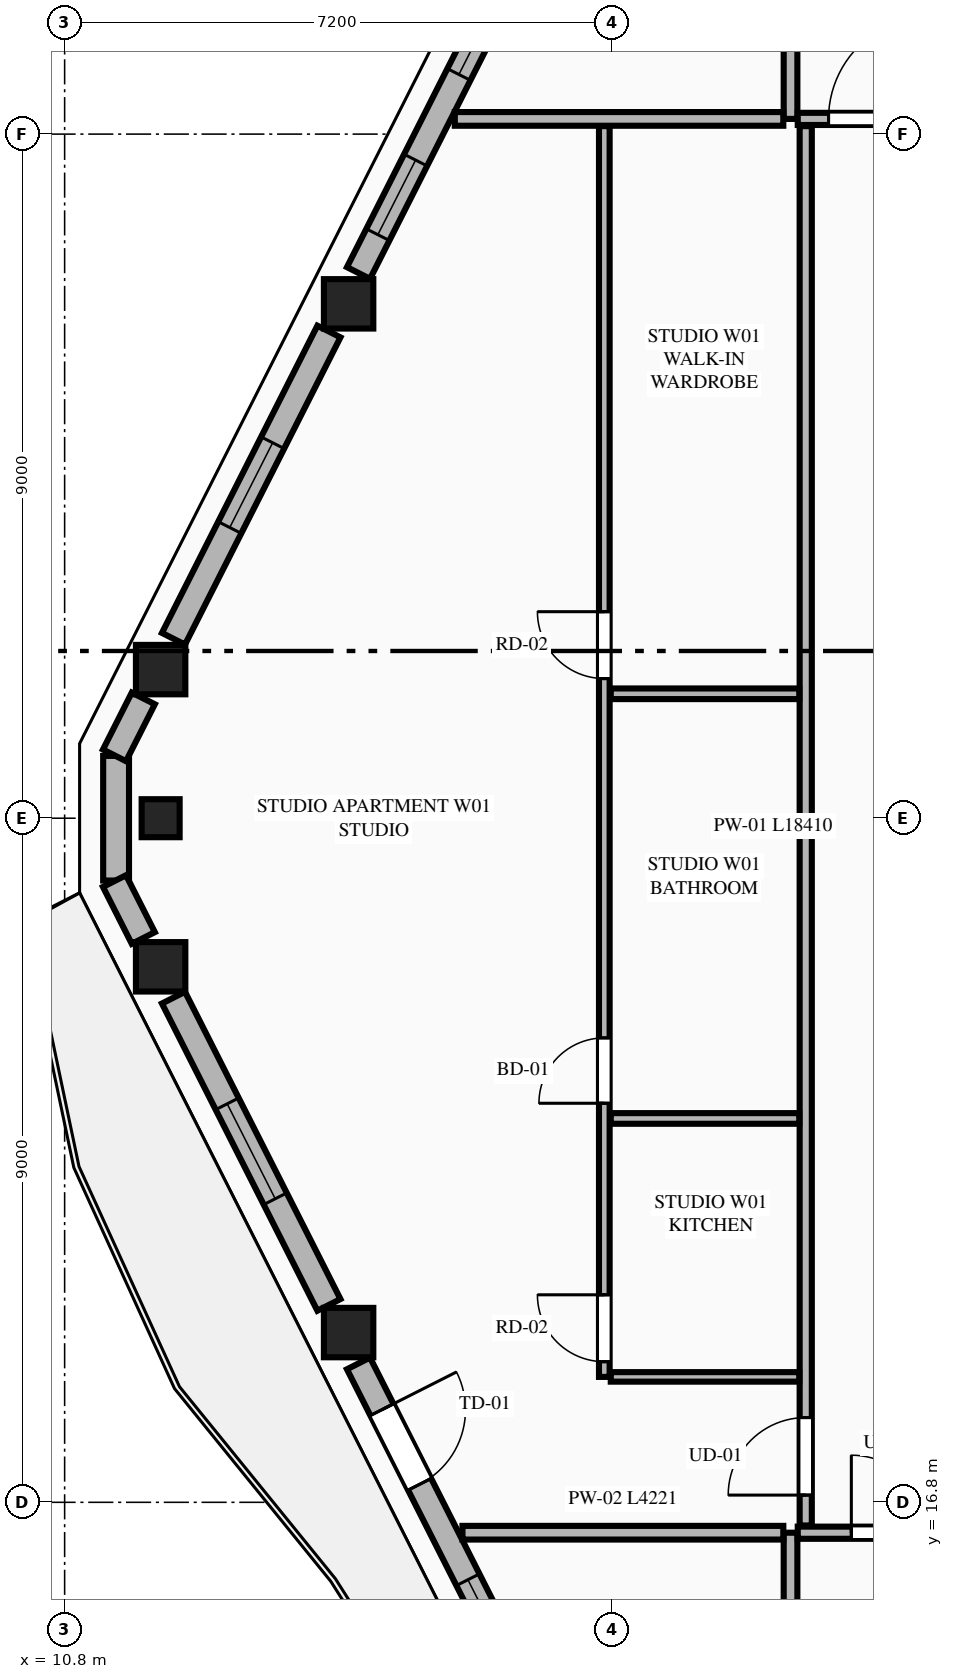
"""IFC4 building model, lengths in metres.
Left out: names, types, materials, properties, quantities, classifications, styles, units other than length and angle.
Written with IfcOpenShell. Run it as: python <this file> out.ifc"""

import sys

from ifc_helpers import new_model, si_unit, direction, frame, frame_2d, origin, origin_2d, place, context, subcontext, project, spatial, rectangle, extrude, element, fill, save


model = new_model("IFC4")
c1 = context("Model", 3, precision=1e-05, world=origin(), true_north=direction((0.0, 1.0)))
c2 = subcontext(c1, "Body", "Model", "MODEL_VIEW")
j1 = project(units=[si_unit("LENGTHUNIT", "METRE"), si_unit("PLANEANGLEUNIT", "RADIAN")], contexts=[c1])
p1 = place(None, origin())
s1 = spatial("IfcSite", under=j1, at=p1, CompositionType="ELEMENT")
p2 = place(p1, origin())
s2 = spatial("IfcBuilding", under=s1, at=p2, CompositionType="ELEMENT")
p3 = place(p2, frame((0.0, 0.0, 263.5)))
s3 = spatial("IfcBuildingStorey", under=s2, at=p3, CompositionType="ELEMENT", Elevation=263.5)
for number, where, z_axis, x_axis in (
    (1, (14.536, 32.567, 0.0), (0.0, 0.0, 1.0), (1.0, 0.0, 0.0)),
    (2, (12.063, 27.755, 0.0), (0.0, 0.0, 1.0), (1.0, 0.0, 0.0)),
    (3, (12.063, 23.845, 0.0), (0.0, 0.0, 1.0), (1.0, 0.0, 0.0)),
    (4, (14.536, 19.033, 0.0), (0.0, 0.0, 1.0), (1.0, 0.0, 0.0)),
):
    element("IfcColumn", number, at=place(p3, frame(where, z_axis=z_axis, x_axis=x_axis)), inside=s3, PredefinedType="COLUMN", context=c2, shape_type="SweptSolid", body=[
        extrude(rectangle(XDim=0.65, YDim=0.65, at=origin_2d()), origin(), (0.0, 0.0, 1.0), 3.65),
    ])
p4 = place(p3, frame((12.063, 25.8, 0.0), z_axis=(0.0, 0.0, 1.0), x_axis=(0.0, -1.0, 0.0)))
e5 = element("IfcColumn", 5, at=p4, inside=s3, PredefinedType="PILASTER", context=c2, shape_type="SweptSolid", body=[
    extrude(rectangle(XDim=0.5, YDim=0.35, at=origin_2d()), origin(), (0.0, 0.0, 1.0), 3.65),
])
p5 = place(p3, frame((11.477, 26.62, 0.0), z_axis=(0.0, 0.0, 1.0), x_axis=(0.0, -1.0, 0.0)))
e6 = element("IfcWall", 6, at=p5, inside=s3, PredefinedType="STANDARD", context=c2, shape_type="SweptSolid", body=[
    extrude(rectangle(XDim=1.64, YDim=0.34, at=frame_2d((0.82, 0.0))), origin(), (0.0, 0.0, 1.0), 3.45),
])
p6 = place(p3, frame((16.798, 37.187, 0.0), z_axis=(0.0, 0.0, 1.0), x_axis=(-0.451447516904, -0.892297674255, 0.0)))
e7 = element("IfcWall", 7, at=p6, inside=s3, PredefinedType="STANDARD", context=c2, shape_type="SweptSolid", body=[
    extrude(rectangle(XDim=4.723, YDim=0.34, at=frame_2d((2.361, 0.0))), origin(), (0.0, 0.0, 1.0), 2.983),
])
p7 = place(p6, frame((0.396, 0.0, 0.75)))
e8 = element("IfcOpeningElement", 8, at=p7, cuts=e7, PredefinedType="OPENING", context=c2, shape_type="SweptSolid", body=[
    extrude(rectangle(XDim=1.4, YDim=2.05, at=frame_2d((0.7, 1.025))), frame((0.0, 0.18, 0.0), z_axis=(0.0, -1.0, 0.0), x_axis=(1.0, 0.0, 0.0)), (0.0, 0.0, 1.0), 0.36),
])
p8 = place(p6, frame((3.058, 0.0, 0.75)))
e9 = element("IfcOpeningElement", 9, at=p8, cuts=e7, PredefinedType="OPENING", context=c2, shape_type="SweptSolid", body=[
    extrude(rectangle(XDim=1.1, YDim=2.0, at=frame_2d((0.55, 1.0))), frame((0.0, 0.18, 0.0), z_axis=(0.0, -1.0, 0.0), x_axis=(1.0, 0.0, 0.0)), (0.0, 0.0, 1.0), 0.36),
])
p9 = place(p3, frame((14.277, 32.203, 0.0), z_axis=(0.0, 0.0, 1.0), x_axis=(-0.45147697324, -0.892282770558, 0.0)))
e10 = element("IfcWall", 10, at=p9, inside=s3, PredefinedType="STANDARD", context=c2, shape_type="SweptSolid", body=[
    extrude(rectangle(XDim=4.53, YDim=0.34, at=frame_2d((2.265, 0.0))), origin(), (0.0, 0.0, 1.0), 2.983),
])
p10 = place(p9, frame((1.64, 0.0, 0.75)))
e11 = element("IfcOpeningElement", 11, at=p10, cuts=e10, PredefinedType="OPENING", context=c2, shape_type="SweptSolid", body=[
    extrude(rectangle(XDim=1.25, YDim=1.95, at=frame_2d((0.625, 0.975))), frame((0.0, 0.18, 0.0), z_axis=(0.0, -1.0, 0.0), x_axis=(1.0, 0.0, 0.0)), (0.0, 0.0, 1.0), 0.36),
])
p11 = place(p3, frame((11.835, 27.376, 0.0), z_axis=(0.0, 0.0, 1.0), x_axis=(-0.45139691133, -0.892323275748, 0.0)))
e12 = element("IfcWall", 12, at=p11, inside=s3, PredefinedType="STANDARD", context=c2, shape_type="SweptSolid", body=[
    extrude(rectangle(XDim=0.839, YDim=0.34, at=frame_2d((0.42, 0.0))), origin(), (0.0, 0.0, 1.0), 3.45),
])
p12 = place(p3, frame((11.456, 24.973, 0.0), z_axis=(0.0, 0.0, 1.0), x_axis=(0.4515140893, -0.892263989615, 0.0)))
e13 = element("IfcWall", 13, at=p12, inside=s3, PredefinedType="STANDARD", context=c2, shape_type="SweptSolid", body=[
    extrude(rectangle(XDim=0.839, YDim=0.34, at=frame_2d((0.419, 0.0))), origin(), (0.0, 0.0, 1.0), 3.45),
])
p13 = place(p3, frame((12.232, 23.439, 0.0), z_axis=(0.0, 0.0, 1.0), x_axis=(0.45147697324, -0.892282770558, 0.0)))
e14 = element("IfcWall", 14, at=p13, inside=s3, PredefinedType="STANDARD", context=c2, shape_type="SweptSolid", body=[
    extrude(rectangle(XDim=4.53, YDim=0.34, at=frame_2d((2.265, 0.0))), origin(), (0.0, 0.0, 1.0), 2.983),
])
p14 = place(p13, frame((1.565, 0.0, 0.75)))
e15 = element("IfcOpeningElement", 15, at=p14, cuts=e14, PredefinedType="OPENING", context=c2, shape_type="SweptSolid", body=[
    extrude(rectangle(XDim=1.4, YDim=2.05, at=frame_2d((0.7, 1.025))), frame((0.0, 0.18, 0.0), z_axis=(0.0, -1.0, 0.0), x_axis=(1.0, 0.0, 0.0)), (0.0, 0.0, 1.0), 0.36),
])
p15 = place(p3, frame((14.666, 18.627, 0.0), z_axis=(0.0, 0.0, 1.0), x_axis=(0.451468341582, -0.892287137949, 0.0)))
e16 = element("IfcWall", 16, at=p15, inside=s3, PredefinedType="STANDARD", context=c2, shape_type="SweptSolid", body=[
    extrude(rectangle(XDim=4.723, YDim=0.34, at=frame_2d((2.361, 0.0))), origin(), (0.0, 0.0, 1.0), 2.983),
])
p16 = place(p15, frame((0.682, 0.0, 0.0)))
e17 = element("IfcOpeningElement", 17, at=p16, cuts=e16, PredefinedType="OPENING", context=c2, shape_type="SweptSolid", body=[
    extrude(rectangle(XDim=1.1, YDim=2.25, at=frame_2d((0.55, 1.125))), frame((0.0, 0.18, 0.0), z_axis=(0.0, -1.0, 0.0), x_axis=(1.0, 0.0, 0.0)), (0.0, 0.0, 1.0), 0.36),
])
p17 = place(p15, frame((3.189, 0.0, 0.75)))
e18 = element("IfcOpeningElement", 18, at=p17, cuts=e16, PredefinedType="OPENING", context=c2, shape_type="SweptSolid", body=[
    extrude(rectangle(XDim=1.1, YDim=2.0, at=frame_2d((0.55, 1.0))), frame((0.0, 0.18, 0.0), z_axis=(0.0, -1.0, 0.0), x_axis=(1.0, 0.0, 0.0)), (0.0, 0.0, 1.0), 0.36),
])
p18 = place(p3, frame((20.35, 8.119, 0.0), z_axis=(0.0, 0.0, 1.0), x_axis=(0.0, 1.0, 0.0)))
e19 = element("IfcWall", 19, at=p18, inside=s3, PredefinedType="PARTITIONING", context=c2, shape_type="SweptSolid", body=[
    extrude(rectangle(XDim=8.281, YDim=0.18, at=frame_2d((4.141, 0.0))), origin(), (0.0, 0.0, 1.0), 3.45),
])
p19 = place(p3, frame((20.445, 16.4, 0.0), z_axis=(0.0, 0.0, 1.0), x_axis=(1.0, 0.0, 0.0)))
e20 = element("IfcWall", 20, at=p19, inside=s3, PredefinedType="PARTITIONING", context=c2, shape_type="SweptSolid", body=[
    extrude(rectangle(XDim=23.91, YDim=0.16, at=frame_2d((11.955, 0.0))), origin(), (0.0, 0.0, 1.0), 3.45),
])
p20 = place(p19, frame((0.705, 0.0, 0.0)))
e21 = element("IfcOpeningElement", 21, at=p20, cuts=e20, PredefinedType="OPENING", context=c2, shape_type="SweptSolid", body=[
    extrude(rectangle(XDim=1.02, YDim=2.25, at=frame_2d((0.51, 1.125))), frame((0.0, 0.09, 0.0), z_axis=(0.0, -1.0, 0.0), x_axis=(1.0, 0.0, 0.0)), (0.0, 0.0, 1.0), 0.18),
])
p21 = place(p3, frame((20.35, 35.0, 0.0), z_axis=(0.0, 0.0, 1.0), x_axis=(0.0, 1.0, 0.0)))
e22 = element("IfcWall", 22, at=p21, inside=s3, PredefinedType="PARTITIONING", context=c2, shape_type="SweptSolid", body=[
    extrude(rectangle(XDim=8.481, YDim=0.18, at=frame_2d((4.24, 0.0))), origin(), (0.0, 0.0, 1.0), 3.45),
])
p22 = place(p3, frame((20.445, 35.0, 0.0), z_axis=(0.0, 0.0, 1.0), x_axis=(1.0, 0.0, 0.0)))
e23 = element("IfcWall", 23, at=p22, inside=s3, PredefinedType="PARTITIONING", context=c2, shape_type="SweptSolid", body=[
    extrude(rectangle(XDim=23.91, YDim=0.16, at=frame_2d((11.955, 0.0))), origin(), (0.0, 0.0, 1.0), 3.45),
])
p23 = place(p22, frame((0.405, 0.0, 0.0)))
e24 = element("IfcOpeningElement", 24, at=p23, cuts=e23, PredefinedType="OPENING", context=c2, shape_type="SweptSolid", body=[
    extrude(rectangle(XDim=1.35, YDim=2.35, at=frame_2d((0.675, 1.175))), frame((0.0, 0.09, 0.0), z_axis=(0.0, -1.0, 0.0), x_axis=(1.0, 0.0, 0.0)), (0.0, 0.0, 1.0), 0.18),
])
p24 = place(p3, frame((16.034, 16.4, 0.0), z_axis=(0.0, 0.0, 1.0), x_axis=(1.0, 0.0, 0.0)))
e25 = element("IfcWall", 25, at=p24, inside=s3, PredefinedType="PARTITIONING", context=c2, shape_type="SweptSolid", body=[
    extrude(rectangle(XDim=4.221, YDim=0.18, at=frame_2d((2.11, 0.0))), origin(), (0.0, 0.0, 1.0), 3.45),
])
p25 = place(p3, frame((15.933, 35.0, 0.0), z_axis=(0.0, 0.0, 1.0), x_axis=(1.0, 0.0, 0.0)))
e26 = element("IfcWall", 26, at=p25, inside=s3, PredefinedType="PARTITIONING", context=c2, shape_type="SweptSolid", body=[
    extrude(rectangle(XDim=4.322, YDim=0.18, at=frame_2d((2.161, 0.0))), origin(), (0.0, 0.0, 1.0), 3.45),
])
p26 = place(p3, frame((20.55, 16.495, 0.0), z_axis=(0.0, 0.0, 1.0), x_axis=(0.0, 1.0, 0.0)))
e27 = element("IfcWall", 27, at=p26, inside=s3, PredefinedType="PARTITIONING", context=c2, shape_type="SweptSolid", body=[
    extrude(rectangle(XDim=18.41, YDim=0.16, at=frame_2d((9.205, 0.0))), origin(), (0.0, 0.0, 1.0), 3.137),
])
p27 = place(p26, frame((0.4, 0.0, 0.0)))
e28 = element("IfcOpeningElement", 28, at=p27, cuts=e27, PredefinedType="OPENING", context=c2, shape_type="SweptSolid", body=[
    extrude(rectangle(XDim=1.02, YDim=2.25, at=frame_2d((0.51, 1.125))), frame((0.0, 0.09, 0.0), z_axis=(0.0, -1.0, 0.0), x_axis=(1.0, 0.0, 0.0)), (0.0, 0.0, 1.0), 0.18),
])
p28 = place(p3, frame((17.985, 18.45, 0.0), z_axis=(0.0, 0.0, 1.0), x_axis=(1.0, 0.0, 0.0)))
e29 = element("IfcWall", 29, at=p28, inside=s3, PredefinedType="PARTITIONING", context=c2, shape_type="SweptSolid", body=[
    extrude(rectangle(XDim=2.48, YDim=0.125, at=frame_2d((1.24, 0.0))), origin(), (0.0, 0.0, 1.0), 3.45),
])
p29 = place(p3, frame((17.9, 18.45, 0.0), z_axis=(0.0, 0.0, 1.0), x_axis=(0.0, 1.0, 0.0)))
e30 = element("IfcWall", 30, at=p29, inside=s3, PredefinedType="PLUMBINGWALL", context=c2, shape_type="SweptSolid", body=[
    extrude(rectangle(XDim=16.455, YDim=0.14, at=frame_2d((8.228, 0.0))), origin(), (0.0, 0.0, 1.0), 3.45),
])
p30 = place(p29, frame((3.6, 0.0, 0.0)))
e31 = element("IfcOpeningElement", 31, at=p30, cuts=e30, PredefinedType="OPENING", context=c2, shape_type="SweptSolid", body=[
    extrude(rectangle(XDim=0.86, YDim=2.1, at=frame_2d((0.43, 1.05))), frame((0.0, 0.08, 0.0), z_axis=(0.0, -1.0, 0.0), x_axis=(1.0, 0.0, 0.0)), (0.0, 0.0, 1.0), 0.16),
])
p31 = place(p29, frame((9.187, 0.0, 0.0)))
e32 = element("IfcOpeningElement", 32, at=p31, cuts=e30, PredefinedType="OPENING", context=c2, shape_type="SweptSolid", body=[
    extrude(rectangle(XDim=0.88, YDim=2.15, at=frame_2d((0.44, 1.075))), frame((0.0, 0.08, 0.0), z_axis=(0.0, -1.0, 0.0), x_axis=(1.0, 0.0, 0.0)), (0.0, 0.0, 1.0), 0.16),
])
p32 = place(p29, frame((0.2, 0.0, 0.0)))
e33 = element("IfcOpeningElement", 33, at=p32, cuts=e30, PredefinedType="OPENING", context=c2, shape_type="SweptSolid", body=[
    extrude(rectangle(XDim=0.88, YDim=2.15, at=frame_2d((0.44, 1.075))), frame((0.0, 0.08, 0.0), z_axis=(0.0, -1.0, 0.0), x_axis=(1.0, 0.0, 0.0)), (0.0, 0.0, 1.0), 0.16),
])
for number, where, z_axis, x_axis in (
    (34, (17.985, 21.85, 0.0), (0.0, 0.0, 1.0), (1.0, 0.0, 0.0)),
    (35, (17.985, 27.437, 0.0), (0.0, 0.0, 1.0), (1.0, 0.0, 0.0)),
):
    element("IfcWall", number, at=place(p3, frame(where, z_axis=z_axis, x_axis=x_axis)), inside=s3, PredefinedType="PLUMBINGWALL", context=c2, shape_type="SweptSolid", body=[
        extrude(rectangle(XDim=2.48, YDim=0.14, at=frame_2d((1.24, 0.0))), origin(), (0.0, 0.0, 1.0), 3.45),
    ])
p33 = place(p7, origin())
e36 = element("IfcWindow", 36, at=p33, inside=s3, PartitioningType="SINGLE_PANEL", PredefinedType="WINDOW", context=c2, shape_type="SweptSolid", body=[
    extrude(rectangle(XDim=1.4, YDim=2.05, at=frame_2d((0.7, 1.025))), frame((0.0, 0.03, 0.0), z_axis=(0.0, -1.0, 0.0), x_axis=(1.0, 0.0, 0.0)), (0.0, 0.0, 1.0), 0.06),
])
fill(e8, e36)
p34 = place(p10, origin())
e37 = element("IfcWindow", 37, at=p34, inside=s3, PartitioningType="SINGLE_PANEL", PredefinedType="WINDOW", context=c2, shape_type="SweptSolid", body=[
    extrude(rectangle(XDim=1.25, YDim=1.95, at=frame_2d((0.625, 0.975))), frame((0.0, 0.03, 0.0), z_axis=(0.0, -1.0, 0.0), x_axis=(1.0, 0.0, 0.0)), (0.0, 0.0, 1.0), 0.06),
])
fill(e11, e37)
p35 = place(p14, origin())
e38 = element("IfcWindow", 38, at=p35, inside=s3, PartitioningType="SINGLE_PANEL", PredefinedType="WINDOW", context=c2, shape_type="SweptSolid", body=[
    extrude(rectangle(XDim=1.4, YDim=2.05, at=frame_2d((0.7, 1.025))), frame((0.0, 0.03, 0.0), z_axis=(0.0, -1.0, 0.0), x_axis=(1.0, 0.0, 0.0)), (0.0, 0.0, 1.0), 0.06),
])
fill(e15, e38)
p36 = place(p16, origin())
e39 = element("IfcDoor", 39, at=p36, inside=s3, OperationType="SINGLE_SWING_LEFT", PredefinedType="DOOR", context=c2, shape_type="SweptSolid", body=[
    extrude(rectangle(XDim=1.1, YDim=2.25, at=frame_2d((0.55, 1.125))), frame((0.0, 0.025, 0.0), z_axis=(0.0, -1.0, 0.0), x_axis=(1.0, 0.0, 0.0)), (0.0, 0.0, 1.0), 0.05),
])
fill(e17, e39)
p37 = place(p20, origin())
e40 = element("IfcDoor", 40, at=p37, inside=s3, OperationType="SINGLE_SWING_LEFT", PredefinedType="DOOR", context=c2, shape_type="SweptSolid", body=[
    extrude(rectangle(XDim=1.02, YDim=2.25, at=frame_2d((0.51, 1.125))), frame((0.0, 0.025, 0.0), z_axis=(0.0, -1.0, 0.0), x_axis=(1.0, 0.0, 0.0)), (0.0, 0.0, 1.0), 0.05),
])
fill(e21, e40)
p38 = place(p23, origin())
e41 = element("IfcDoor", 41, at=p38, inside=s3, OperationType="SINGLE_SWING_RIGHT", PredefinedType="DOOR", context=c2, shape_type="SweptSolid", body=[
    extrude(rectangle(XDim=1.35, YDim=2.35, at=frame_2d((0.675, 1.175))), frame((0.0, 0.025, 0.0), z_axis=(0.0, -1.0, 0.0), x_axis=(1.0, 0.0, 0.0)), (0.0, 0.0, 1.0), 0.05),
])
fill(e24, e41)
p39 = place(p30, origin())
e42 = element("IfcDoor", 42, at=p39, inside=s3, OperationType="SINGLE_SWING_LEFT", PredefinedType="DOOR", context=c2, shape_type="SweptSolid", body=[
    extrude(rectangle(XDim=0.86, YDim=2.1, at=frame_2d((0.43, 1.05))), frame((0.0, 0.025, 0.0), z_axis=(0.0, -1.0, 0.0), x_axis=(1.0, 0.0, 0.0)), (0.0, 0.0, 1.0), 0.05),
])
fill(e31, e42)
p40 = place(p31, origin())
e43 = element("IfcDoor", 43, at=p40, inside=s3, OperationType="SINGLE_SWING_RIGHT", PredefinedType="DOOR", context=c2, shape_type="SweptSolid", body=[
    extrude(rectangle(XDim=0.88, YDim=2.15, at=frame_2d((0.44, 1.075))), frame((0.0, 0.025, 0.0), z_axis=(0.0, -1.0, 0.0), x_axis=(1.0, 0.0, 0.0)), (0.0, 0.0, 1.0), 0.05),
])
fill(e32, e43)
p41 = place(p27, origin())
e44 = element("IfcDoor", 44, at=p41, inside=s3, OperationType="SINGLE_SWING_LEFT", PredefinedType="DOOR", context=c2, shape_type="SweptSolid", body=[
    extrude(rectangle(XDim=1.02, YDim=2.25, at=frame_2d((0.51, 1.125))), frame((0.0, 0.025, 0.0), z_axis=(0.0, -1.0, 0.0), x_axis=(1.0, 0.0, 0.0)), (0.0, 0.0, 1.0), 0.05),
])
fill(e28, e44)
p42 = place(p32, origin())
e45 = element("IfcDoor", 45, at=p42, inside=s3, OperationType="SINGLE_SWING_RIGHT", PredefinedType="DOOR", context=c2, shape_type="SweptSolid", body=[
    extrude(rectangle(XDim=0.88, YDim=2.15, at=frame_2d((0.44, 1.075))), frame((0.0, 0.025, 0.0), z_axis=(0.0, -1.0, 0.0), x_axis=(1.0, 0.0, 0.0)), (0.0, 0.0, 1.0), 0.05),
])
fill(e33, e45)
p43 = place(p8, origin())
e46 = element("IfcWindow", 46, at=p43, inside=s3, PartitioningType="SINGLE_PANEL", PredefinedType="WINDOW", context=c2, shape_type="SweptSolid", body=[
    extrude(rectangle(XDim=1.1, YDim=2.0, at=frame_2d((0.55, 1.0))), frame((0.0, 0.03, 0.0), z_axis=(0.0, -1.0, 0.0), x_axis=(1.0, 0.0, 0.0)), (0.0, 0.0, 1.0), 0.06),
])
fill(e9, e46)
p44 = place(p17, origin())
e47 = element("IfcWindow", 47, at=p44, inside=s3, PartitioningType="SINGLE_PANEL", PredefinedType="WINDOW", context=c2, shape_type="SweptSolid", body=[
    extrude(rectangle(XDim=1.1, YDim=2.0, at=frame_2d((0.55, 1.0))), frame((0.0, 0.03, 0.0), z_axis=(0.0, -1.0, 0.0), x_axis=(1.0, 0.0, 0.0)), (0.0, 0.0, 1.0), 0.06),
])
fill(e18, e47)
save(model, sys.argv[1])
